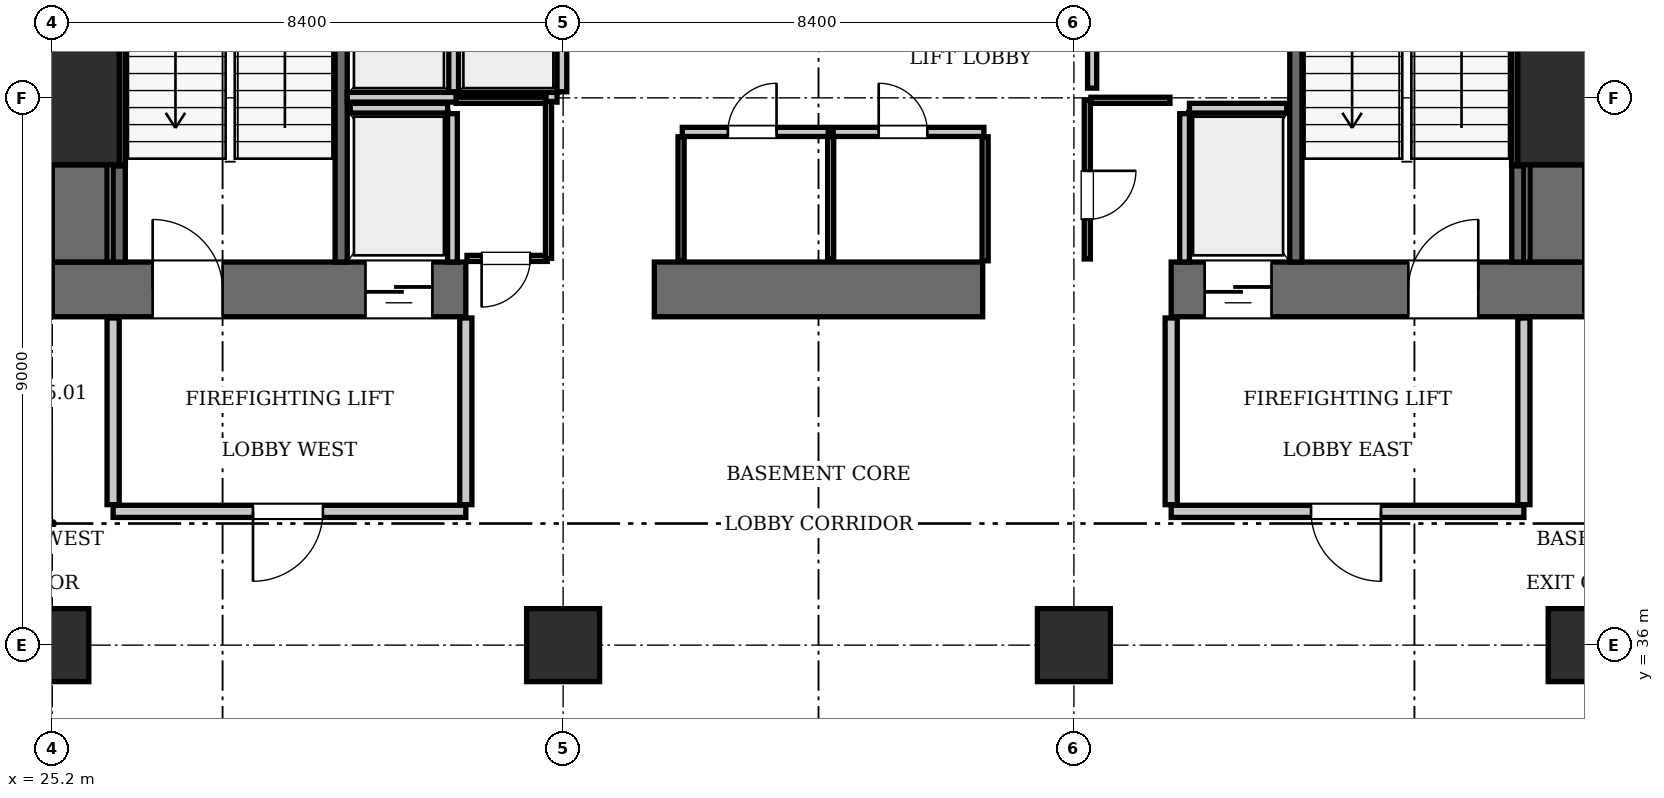
"""IFC4 building model, lengths in metres.
Left out: names, types, materials, properties, quantities, classifications, styles, units other than length and angle.
Written with IfcOpenShell. Run it as: python <this file> out.ifc"""

import sys

from ifc_helpers import new_model, si_unit, direction, frame, frame_2d, origin, origin_2d, place, context, subcontext, project, spatial, rectangle, extrude, element, fill, save


model = new_model("IFC4")
c1 = context("Model", 3, precision=1e-05, world=origin(), true_north=direction((0.0, 1.0)))
c2 = subcontext(c1, "Body", "Model", "MODEL_VIEW")
j1 = project(units=[si_unit("LENGTHUNIT", "METRE"), si_unit("PLANEANGLEUNIT", "RADIAN")], contexts=[c1])
p1 = place(None, origin())
s1 = spatial("IfcSite", under=j1, at=p1, CompositionType="ELEMENT")
p2 = place(p1, origin())
s2 = spatial("IfcBuilding", under=s1, at=p2, CompositionType="ELEMENT")
p3 = place(p2, frame((0.0, 0.0, -9.8)))
s3 = spatial("IfcBuildingStorey", under=s2, at=p3, CompositionType="ELEMENT", Elevation=-9.8)
for number, where, z_axis, x_axis in (
    (1, (25.2, 45.0, -0.4), (0.0, 0.0, 1.0), (1.0, 0.0, 0.0)),
    (2, (50.4, 45.0, -0.4), (0.0, 0.0, 1.0), (1.0, 0.0, 0.0)),
):
    element("IfcColumn", number, at=place(p3, frame(where, z_axis=z_axis, x_axis=x_axis)), inside=s3, PredefinedType="COLUMN", context=c2, shape_type="SweptSolid", body=[
        extrude(rectangle(XDim=2.2, YDim=2.2, at=origin_2d()), origin(), (0.0, 0.0, 1.0), 4.95),
    ])
p4 = place(p3, frame((25.2, 41.85, 0.0), z_axis=(0.0, 0.0, 1.0), x_axis=(1.0, 0.0, 0.0)))
e3 = element("IfcWall", 3, at=p4, inside=s3, PredefinedType="SHEAR", context=c2, shape_type="SweptSolid", body=[
    extrude(rectangle(XDim=6.8, YDim=0.9, at=frame_2d((3.4, 0.0))), origin(), (0.0, 0.0, 1.0), 4.55),
])
p5 = place(p4, frame((1.65, 0.0, 0.0)))
e4 = element("IfcOpeningElement", 4, at=p5, cuts=e3, PredefinedType="OPENING", context=c2, shape_type="SweptSolid", body=[
    extrude(rectangle(XDim=1.15, YDim=2.15, at=frame_2d((0.575, 1.075))), frame((0.0, 0.46, 0.0), z_axis=(0.0, -1.0, 0.0), x_axis=(1.0, 0.0, 0.0)), (0.0, 0.0, 1.0), 0.92),
])
p6 = place(p4, frame((5.15, 0.0, 0.0)))
e5 = element("IfcOpeningElement", 5, at=p6, cuts=e3, PredefinedType="OPENING", context=c2, shape_type="SweptSolid", body=[
    extrude(rectangle(XDim=1.1, YDim=2.2, at=frame_2d((0.55, 1.1))), frame((0.0, 0.46, 0.0), z_axis=(0.0, -1.0, 0.0), x_axis=(1.0, 0.0, 0.0)), (0.0, 0.0, 1.0), 0.92),
])
p7 = place(p3, frame((35.1, 41.85, 0.0), z_axis=(0.0, 0.0, 1.0), x_axis=(1.0, 0.0, 0.0)))
e6 = element("IfcWall", 6, at=p7, inside=s3, PredefinedType="SHEAR", context=c2, shape_type="SweptSolid", body=[
    extrude(rectangle(XDim=5.4, YDim=0.9, at=frame_2d((2.7, 0.0))), origin(), (0.0, 0.0, 1.0), 4.55),
])
p8 = place(p3, frame((43.6, 41.85, 0.0), z_axis=(0.0, 0.0, 1.0), x_axis=(1.0, 0.0, 0.0)))
e7 = element("IfcWall", 7, at=p8, inside=s3, PredefinedType="SHEAR", context=c2, shape_type="SweptSolid", body=[
    extrude(rectangle(XDim=6.8, YDim=0.9, at=frame_2d((3.4, 0.0))), origin(), (0.0, 0.0, 1.0), 4.55),
])
p9 = place(p8, frame((3.9, 0.0, 0.0)))
e8 = element("IfcOpeningElement", 8, at=p9, cuts=e7, PredefinedType="OPENING", context=c2, shape_type="SweptSolid", body=[
    extrude(rectangle(XDim=1.15, YDim=2.15, at=frame_2d((0.575, 1.075))), frame((0.0, 0.46, 0.0), z_axis=(0.0, -1.0, 0.0), x_axis=(1.0, 0.0, 0.0)), (0.0, 0.0, 1.0), 0.92),
])
p10 = place(p8, frame((0.55, 0.0, 0.0)))
e9 = element("IfcOpeningElement", 9, at=p10, cuts=e7, PredefinedType="OPENING", context=c2, shape_type="SweptSolid", body=[
    extrude(rectangle(XDim=1.1, YDim=2.2, at=frame_2d((0.55, 1.1))), frame((0.0, 0.46, 0.0), z_axis=(0.0, -1.0, 0.0), x_axis=(1.0, 0.0, 0.0)), (0.0, 0.0, 1.0), 0.92),
])
for number, where, z_axis, x_axis in (
    (10, (25.65, 42.3, 0.0), (0.0, 0.0, 1.0), (0.0, 1.0, 0.0)),
    (11, (49.95, 42.3, 0.0), (0.0, 0.0, 1.0), (0.0, 1.0, 0.0)),
):
    element("IfcWall", number, at=place(p3, frame(where, z_axis=z_axis, x_axis=x_axis)), inside=s3, PredefinedType="SHEAR", context=c2, shape_type="SweptSolid", body=[
        extrude(rectangle(XDim=1.6, YDim=0.9, at=frame_2d((0.8, 0.0))), origin(), (0.0, 0.0, 1.0), 4.55),
    ])
for number, where, z_axis, x_axis in (
    (12, (25.2, 36.0, -0.4), (0.0, 0.0, 1.0), (1.0, 0.0, 0.0)),
    (13, (33.6, 36.0, -0.4), (0.0, 0.0, 1.0), (1.0, 0.0, 0.0)),
    (14, (42.0, 36.0, -0.4), (0.0, 0.0, 1.0), (1.0, 0.0, 0.0)),
    (15, (50.4, 36.0, -0.4), (0.0, 0.0, 1.0), (1.0, 0.0, 0.0)),
):
    element("IfcColumn", number, at=place(p3, frame(where, z_axis=z_axis, x_axis=x_axis)), inside=s3, PredefinedType="COLUMN", context=c2, shape_type="SweptSolid", body=[
        extrude(rectangle(XDim=1.2, YDim=1.2, at=origin_2d()), origin(), (0.0, 0.0, 1.0), 4.95),
    ])
p11 = place(p3, frame((29.95, 42.3, 0.0), z_axis=(0.0, 0.0, 1.0), x_axis=(0.0, 1.0, 0.0)))
e16 = element("IfcWall", 16, at=p11, inside=s3, PredefinedType="SOLIDWALL", context=c2, shape_type="SweptSolid", body=[
    extrude(rectangle(XDim=8.85, YDim=0.2, at=frame_2d((4.425, 0.0))), origin(), (0.0, 0.0, 1.0), 4.2),
])
p12 = place(p3, frame((26.3, 42.3, 0.0), z_axis=(0.0, 0.0, 1.0), x_axis=(0.0, 1.0, 0.0)))
e17 = element("IfcWall", 17, at=p12, inside=s3, PredefinedType="SOLIDWALL", context=c2, shape_type="SweptSolid", body=[
    extrude(rectangle(XDim=1.58, YDim=0.2, at=frame_2d((0.79, 0.0))), origin(), (0.0, 0.0, 1.0), 4.2),
])
p13 = place(p3, frame((26.352, 43.9, 0.0), z_axis=(0.0, 0.0, 1.0), x_axis=(0.0, 1.0, 0.0)))
e18 = element("IfcWall", 18, at=p13, inside=s3, PredefinedType="SOLIDWALL", context=c2, shape_type="SweptSolid", body=[
    extrude(rectangle(XDim=2.2, YDim=0.1, at=frame_2d((1.1, 0.0))), origin(), (0.0, 0.0, 1.0), 4.2),
])
p14 = place(p3, frame((45.65, 42.3, 0.0), z_axis=(0.0, 0.0, 1.0), x_axis=(0.0, 1.0, 0.0)))
e19 = element("IfcWall", 19, at=p14, inside=s3, PredefinedType="SOLIDWALL", context=c2, shape_type="SweptSolid", body=[
    extrude(rectangle(XDim=8.85, YDim=0.2, at=frame_2d((4.425, 0.0))), origin(), (0.0, 0.0, 1.0), 4.2),
])
p15 = place(p3, frame((49.3, 42.3, 0.0), z_axis=(0.0, 0.0, 1.0), x_axis=(0.0, 1.0, 0.0)))
e20 = element("IfcWall", 20, at=p15, inside=s3, PredefinedType="SOLIDWALL", context=c2, shape_type="SweptSolid", body=[
    extrude(rectangle(XDim=1.58, YDim=0.2, at=frame_2d((0.79, 0.0))), origin(), (0.0, 0.0, 1.0), 4.2),
])
p16 = place(p3, frame((49.248, 43.9, 0.0), z_axis=(0.0, 0.0, 1.0), x_axis=(0.0, 1.0, 0.0)))
e21 = element("IfcWall", 21, at=p16, inside=s3, PredefinedType="SOLIDWALL", context=c2, shape_type="SweptSolid", body=[
    extrude(rectangle(XDim=2.2, YDim=0.1, at=frame_2d((1.1, 0.0))), origin(), (0.0, 0.0, 1.0), 4.2),
])
p17 = place(p3, frame((30.1, 44.83, 0.0), z_axis=(0.0, 0.0, 1.0), x_axis=(1.0, 0.0, 0.0)))
e22 = element("IfcWall", 22, at=p17, inside=s3, PredefinedType="SOLIDWALL", context=c2, shape_type="SweptSolid", body=[
    extrude(rectangle(XDim=1.6, YDim=0.16, at=frame_2d((0.8, 0.0))), origin(), (0.0, 0.0, 1.0), 4.2),
])
p18 = place(p3, frame((31.78, 42.3, 0.0), z_axis=(0.0, 0.0, 1.0), x_axis=(0.0, 1.0, 0.0)))
e23 = element("IfcWall", 23, at=p18, inside=s3, PredefinedType="SOLIDWALL", context=c2, shape_type="SweptSolid", body=[
    extrude(rectangle(XDim=2.44, YDim=0.16, at=frame_2d((1.22, 0.0))), origin(), (0.0, 0.0, 1.0), 4.2),
])
p19 = place(p3, frame((43.9, 44.83, 0.0), z_axis=(0.0, 0.0, 1.0), x_axis=(1.0, 0.0, 0.0)))
e24 = element("IfcWall", 24, at=p19, inside=s3, PredefinedType="SOLIDWALL", context=c2, shape_type="SweptSolid", body=[
    extrude(rectangle(XDim=1.6, YDim=0.16, at=frame_2d((0.8, 0.0))), origin(), (0.0, 0.0, 1.0), 4.2),
])
p20 = place(p3, frame((43.82, 42.3, 0.0), z_axis=(0.0, 0.0, 1.0), x_axis=(0.0, 1.0, 0.0)))
e25 = element("IfcWall", 25, at=p20, inside=s3, PredefinedType="SOLIDWALL", context=c2, shape_type="SweptSolid", body=[
    extrude(rectangle(XDim=2.44, YDim=0.16, at=frame_2d((1.22, 0.0))), origin(), (0.0, 0.0, 1.0), 4.2),
])
for number, where, z_axis, x_axis in (
    (26, (31.8, 45.1, 0.0), (0.0, 0.0, 1.0), (0.0, 1.0, 0.0)),
    (27, (33.58, 45.1, 0.0), (0.0, 0.0, 1.0), (0.0, 1.0, 0.0)),
):
    element("IfcWall", number, at=place(p3, frame(where, z_axis=z_axis, x_axis=x_axis)), inside=s3, PredefinedType="SOLIDWALL", context=c2, shape_type="SweptSolid", body=[
        extrude(rectangle(XDim=1.95, YDim=0.16, at=frame_2d((0.975, 0.0))), origin(), (0.0, 0.0, 1.0), 4.2),
    ])
p21 = place(p3, frame((30.05, 45.01, 0.0), z_axis=(0.0, 0.0, 1.0), x_axis=(1.0, 0.0, 0.0)))
e28 = element("IfcWall", 28, at=p21, inside=s3, PredefinedType="SOLIDWALL", context=c2, shape_type="SweptSolid", body=[
    extrude(rectangle(XDim=3.45, YDim=0.16, at=frame_2d((1.725, 0.0))), origin(), (0.0, 0.0, 1.0), 4.2),
])
p22 = place(p3, frame((26.2, 38.2, 0.0), z_axis=(0.0, 0.0, 1.0), x_axis=(1.0, 0.0, 0.0)))
e29 = element("IfcWall", 29, at=p22, inside=s3, PredefinedType="PARTITIONING", context=c2, shape_type="SweptSolid", body=[
    extrude(rectangle(XDim=5.8, YDim=0.2, at=frame_2d((2.9, 0.0))), origin(), (0.0, 0.0, 1.0), 4.2),
])
p23 = place(p22, frame((2.3, 0.0, 0.0)))
e30 = element("IfcOpeningElement", 30, at=p23, cuts=e29, PredefinedType="OPENING", context=c2, shape_type="SweptSolid", body=[
    extrude(rectangle(XDim=1.15, YDim=2.15, at=frame_2d((0.575, 1.075))), frame((0.0, 0.11, 0.0), z_axis=(0.0, -1.0, 0.0), x_axis=(1.0, 0.0, 0.0)), (0.0, 0.0, 1.0), 0.22),
])
for number, where, z_axis, x_axis in (
    (31, (26.2, 38.31, 0.0), (0.0, 0.0, 1.0), (0.0, 1.0, 0.0)),
    (32, (32.0, 38.31, 0.0), (0.0, 0.0, 1.0), (0.0, 1.0, 0.0)),
):
    element("IfcWall", number, at=place(p3, frame(where, z_axis=z_axis, x_axis=x_axis)), inside=s3, PredefinedType="PARTITIONING", context=c2, shape_type="SweptSolid", body=[
        extrude(rectangle(XDim=3.07, YDim=0.2, at=frame_2d((1.535, 0.0))), origin(), (0.0, 0.0, 1.0), 4.2),
    ])
p24 = place(p3, frame((43.6, 38.2, 0.0), z_axis=(0.0, 0.0, 1.0), x_axis=(1.0, 0.0, 0.0)))
e33 = element("IfcWall", 33, at=p24, inside=s3, PredefinedType="PARTITIONING", context=c2, shape_type="SweptSolid", body=[
    extrude(rectangle(XDim=5.8, YDim=0.2, at=frame_2d((2.9, 0.0))), origin(), (0.0, 0.0, 1.0), 4.2),
])
p25 = place(p24, frame((2.3, 0.0, 0.0)))
e34 = element("IfcOpeningElement", 34, at=p25, cuts=e33, PredefinedType="OPENING", context=c2, shape_type="SweptSolid", body=[
    extrude(rectangle(XDim=1.15, YDim=2.15, at=frame_2d((0.575, 1.075))), frame((0.0, 0.11, 0.0), z_axis=(0.0, -1.0, 0.0), x_axis=(1.0, 0.0, 0.0)), (0.0, 0.0, 1.0), 0.22),
])
for number, where, z_axis, x_axis in (
    (35, (43.6, 38.31, 0.0), (0.0, 0.0, 1.0), (0.0, 1.0, 0.0)),
    (36, (49.4, 38.31, 0.0), (0.0, 0.0, 1.0), (0.0, 1.0, 0.0)),
):
    element("IfcWall", number, at=place(p3, frame(where, z_axis=z_axis, x_axis=x_axis)), inside=s3, PredefinedType="PARTITIONING", context=c2, shape_type="SweptSolid", body=[
        extrude(rectangle(XDim=3.07, YDim=0.2, at=frame_2d((1.535, 0.0))), origin(), (0.0, 0.0, 1.0), 4.2),
    ])
p26 = place(p3, frame((32.02, 42.36, 0.0), z_axis=(0.0, 0.0, 1.0), x_axis=(1.0, 0.0, 0.0)))
e37 = element("IfcWall", 37, at=p26, inside=s3, PredefinedType="PARTITIONING", context=c2, shape_type="SweptSolid", body=[
    extrude(rectangle(XDim=1.32, YDim=0.1, at=frame_2d((0.66, 0.0))), origin(), (0.0, 0.0, 1.0), 4.2),
])
p27 = place(p26, frame((0.24, 0.0, 0.0)))
e38 = element("IfcOpeningElement", 38, at=p27, cuts=e37, PredefinedType="OPENING", context=c2, shape_type="SweptSolid", body=[
    extrude(rectangle(XDim=0.8, YDim=2.05, at=frame_2d((0.4, 1.025))), frame((0.0, 0.06, 0.0), z_axis=(0.0, -1.0, 0.0), x_axis=(1.0, 0.0, 0.0)), (0.0, 0.0, 1.0), 0.12),
])
p28 = place(p3, frame((31.84, 44.96, 0.0), z_axis=(0.0, 0.0, 1.0), x_axis=(1.0, 0.0, 0.0)))
e39 = element("IfcWall", 39, at=p28, inside=s3, PredefinedType="PARTITIONING", context=c2, shape_type="SweptSolid", body=[
    extrude(rectangle(XDim=1.48, YDim=0.1, at=frame_2d((0.74, 0.0))), origin(), (0.0, 0.0, 1.0), 4.2),
])
p29 = place(p3, frame((33.36, 42.36, 0.0), z_axis=(0.0, 0.0, 1.0), x_axis=(0.0, 1.0, 0.0)))
e40 = element("IfcWall", 40, at=p29, inside=s3, PredefinedType="PARTITIONING", context=c2, shape_type="SweptSolid", body=[
    extrude(rectangle(XDim=2.58, YDim=0.1, at=frame_2d((1.29, 0.0))), origin(), (0.0, 0.0, 1.0), 4.2),
])
p30 = place(p3, frame((42.22, 42.35, 0.0), z_axis=(0.0, 0.0, 1.0), x_axis=(0.0, 1.0, 0.0)))
e41 = element("IfcWall", 41, at=p30, inside=s3, PredefinedType="PARTITIONING", context=c2, shape_type="SweptSolid", body=[
    extrude(rectangle(XDim=2.61, YDim=0.1, at=frame_2d((1.305, 0.0))), origin(), (0.0, 0.0, 1.0), 4.2),
])
p31 = place(p30, frame((0.65, 0.0, 0.0)))
e42 = element("IfcOpeningElement", 42, at=p31, cuts=e41, PredefinedType="OPENING", context=c2, shape_type="SweptSolid", body=[
    extrude(rectangle(XDim=0.8, YDim=2.05, at=frame_2d((0.4, 1.025))), frame((0.0, 0.06, 0.0), z_axis=(0.0, -1.0, 0.0), x_axis=(1.0, 0.0, 0.0)), (0.0, 0.0, 1.0), 0.12),
])
p32 = place(p3, frame((42.28, 44.96, 0.0), z_axis=(0.0, 0.0, 1.0), x_axis=(1.0, 0.0, 0.0)))
e43 = element("IfcWall", 43, at=p32, inside=s3, PredefinedType="PARTITIONING", context=c2, shape_type="SweptSolid", body=[
    extrude(rectangle(XDim=1.3, YDim=0.1, at=frame_2d((0.65, 0.0))), origin(), (0.0, 0.0, 1.0), 4.2),
])
p33 = place(p3, frame((35.56, 44.44, 0.0), z_axis=(0.0, 0.0, 1.0), x_axis=(1.0, 0.0, 0.0)))
e44 = element("IfcWall", 44, at=p33, inside=s3, PredefinedType="PARTITIONING", context=c2, shape_type="SweptSolid", body=[
    extrude(rectangle(XDim=2.4, YDim=0.15, at=frame_2d((1.2, 0.0))), origin(), (0.0, 0.0, 1.0), 4.2),
])
p34 = place(p33, frame((0.75, 0.0, 0.0)))
e45 = element("IfcOpeningElement", 45, at=p34, cuts=e44, PredefinedType="OPENING", context=c2, shape_type="SweptSolid", body=[
    extrude(rectangle(XDim=0.8, YDim=2.05, at=frame_2d((0.4, 1.025))), frame((0.0, 0.085, 0.0), z_axis=(0.0, -1.0, 0.0), x_axis=(1.0, 0.0, 0.0)), (0.0, 0.0, 1.0), 0.17),
])
p35 = place(p3, frame((38.04, 44.44, 0.0), z_axis=(0.0, 0.0, 1.0), x_axis=(1.0, 0.0, 0.0)))
e46 = element("IfcWall", 46, at=p35, inside=s3, PredefinedType="PARTITIONING", context=c2, shape_type="SweptSolid", body=[
    extrude(rectangle(XDim=2.48, YDim=0.15, at=frame_2d((1.24, 0.0))), origin(), (0.0, 0.0, 1.0), 4.2),
])
p36 = place(p35, frame((0.75, 0.0, 0.0)))
e47 = element("IfcOpeningElement", 47, at=p36, cuts=e46, PredefinedType="OPENING", context=c2, shape_type="SweptSolid", body=[
    extrude(rectangle(XDim=0.8, YDim=2.05, at=frame_2d((0.4, 1.025))), frame((0.0, 0.085, 0.0), z_axis=(0.0, -1.0, 0.0), x_axis=(1.0, 0.0, 0.0)), (0.0, 0.0, 1.0), 0.17),
])
for number, where, z_axis, x_axis in (
    (48, (35.54, 42.32, 0.0), (0.0, 0.0, 1.0), (0.0, 1.0, 0.0)),
    (49, (40.54, 42.32, 0.0), (0.0, 0.0, 1.0), (0.0, 1.0, 0.0)),
):
    element("IfcWall", number, at=place(p3, frame(where, z_axis=z_axis, x_axis=x_axis)), inside=s3, PredefinedType="PARTITIONING", context=c2, shape_type="SweptSolid", body=[
        extrude(rectangle(XDim=2.04, YDim=0.1, at=frame_2d((1.02, 0.0))), origin(), (0.0, 0.0, 1.0), 4.2),
    ])
p37 = place(p3, frame((38.0, 42.35, 0.0), z_axis=(0.0, 0.0, 1.0), x_axis=(0.0, 1.0, 0.0)))
e50 = element("IfcWall", 50, at=p37, inside=s3, PredefinedType="PARTITIONING", context=c2, shape_type="SweptSolid", body=[
    extrude(rectangle(XDim=2.01, YDim=0.1, at=frame_2d((1.005, 0.0))), origin(), (0.0, 0.0, 1.0), 4.2),
])
p38 = place(p3, frame((42.3, 45.16, 0.0), z_axis=(0.0, 0.0, 1.0), x_axis=(0.0, 1.0, 0.0)))
e51 = element("IfcWall", 51, at=p38, inside=s3, PredefinedType="PARTITIONING", context=c2, shape_type="SweptSolid", body=[
    extrude(rectangle(XDim=4.24, YDim=0.15, at=frame_2d((2.12, 0.0))), origin(), (0.0, 0.0, 1.0), 4.2),
])
p39 = place(p38, frame((1.8, 0.0, 0.0)))
e52 = element("IfcOpeningElement", 52, at=p39, cuts=e51, PredefinedType="OPENING", context=c2, shape_type="SweptSolid", body=[
    extrude(rectangle(XDim=0.9, YDim=2.1, at=frame_2d((0.45, 1.05))), frame((0.0, 0.085, 0.0), z_axis=(0.0, -1.0, 0.0), x_axis=(1.0, 0.0, 0.0)), (0.0, 0.0, 1.0), 0.17),
])
p40 = place(p5, origin())
e53 = element("IfcDoor", 53, at=p40, inside=s3, OperationType="SINGLE_SWING_LEFT", PredefinedType="DOOR", context=c2, shape_type="SweptSolid", body=[
    extrude(rectangle(XDim=1.15, YDim=2.15, at=frame_2d((0.575, 1.075))), frame((0.0, 0.025, 0.0), z_axis=(0.0, -1.0, 0.0), x_axis=(1.0, 0.0, 0.0)), (0.0, 0.0, 1.0), 0.05),
])
fill(e4, e53)
p41 = place(p9, origin())
e54 = element("IfcDoor", 54, at=p41, inside=s3, OperationType="SINGLE_SWING_RIGHT", PredefinedType="DOOR", context=c2, shape_type="SweptSolid", body=[
    extrude(rectangle(XDim=1.15, YDim=2.15, at=frame_2d((0.575, 1.075))), frame((0.0, 0.025, 0.0), z_axis=(0.0, -1.0, 0.0), x_axis=(1.0, 0.0, 0.0)), (0.0, 0.0, 1.0), 0.05),
])
fill(e8, e54)
p42 = place(p6, frame((1.1, 0.0, 0.0), z_axis=(0.0, 0.0, 1.0), x_axis=(-1.0, 0.0, 0.0)))
e55 = element("IfcDoor", 55, at=p42, inside=s3, OperationType="SLIDING_TO_LEFT", PredefinedType="DOOR", context=c2, shape_type="SweptSolid", body=[
    extrude(rectangle(XDim=1.1, YDim=2.2, at=frame_2d((0.55, 1.1))), frame((0.0, 0.025, 0.0), z_axis=(0.0, -1.0, 0.0), x_axis=(1.0, 0.0, 0.0)), (0.0, 0.0, 1.0), 0.05),
])
fill(e5, e55)
p43 = place(p10, frame((1.1, 0.0, 0.0), z_axis=(0.0, 0.0, 1.0), x_axis=(-1.0, 0.0, 0.0)))
e56 = element("IfcDoor", 56, at=p43, inside=s3, OperationType="SLIDING_TO_LEFT", PredefinedType="DOOR", context=c2, shape_type="SweptSolid", body=[
    extrude(rectangle(XDim=1.1, YDim=2.2, at=frame_2d((0.55, 1.1))), frame((0.0, 0.025, 0.0), z_axis=(0.0, -1.0, 0.0), x_axis=(1.0, 0.0, 0.0)), (0.0, 0.0, 1.0), 0.05),
])
fill(e9, e56)
p44 = place(p23, frame((1.15, 0.0, 0.0), z_axis=(0.0, 0.0, 1.0), x_axis=(-1.0, 0.0, 0.0)))
e57 = element("IfcDoor", 57, at=p44, inside=s3, OperationType="SINGLE_SWING_RIGHT", PredefinedType="DOOR", context=c2, shape_type="SweptSolid", body=[
    extrude(rectangle(XDim=1.15, YDim=2.15, at=frame_2d((0.575, 1.075))), frame((0.0, 0.025, 0.0), z_axis=(0.0, -1.0, 0.0), x_axis=(1.0, 0.0, 0.0)), (0.0, 0.0, 1.0), 0.05),
])
fill(e30, e57)
p45 = place(p25, frame((1.15, 0.0, 0.0), z_axis=(0.0, 0.0, 1.0), x_axis=(-1.0, 0.0, 0.0)))
e58 = element("IfcDoor", 58, at=p45, inside=s3, OperationType="SINGLE_SWING_LEFT", PredefinedType="DOOR", context=c2, shape_type="SweptSolid", body=[
    extrude(rectangle(XDim=1.15, YDim=2.15, at=frame_2d((0.575, 1.075))), frame((0.0, 0.025, 0.0), z_axis=(0.0, -1.0, 0.0), x_axis=(1.0, 0.0, 0.0)), (0.0, 0.0, 1.0), 0.05),
])
fill(e34, e58)
p46 = place(p27, frame((0.8, 0.0, 0.0), z_axis=(0.0, 0.0, 1.0), x_axis=(-1.0, 0.0, 0.0)))
e59 = element("IfcDoor", 59, at=p46, inside=s3, OperationType="SINGLE_SWING_RIGHT", PredefinedType="DOOR", context=c2, shape_type="SweptSolid", body=[
    extrude(rectangle(XDim=0.8, YDim=2.05, at=frame_2d((0.4, 1.025))), frame((0.0, 0.025, 0.0), z_axis=(0.0, -1.0, 0.0), x_axis=(1.0, 0.0, 0.0)), (0.0, 0.0, 1.0), 0.05),
])
fill(e38, e59)
p47 = place(p31, frame((0.8, 0.0, 0.0), z_axis=(0.0, 0.0, 1.0), x_axis=(-1.0, 0.0, 0.0)))
e60 = element("IfcDoor", 60, at=p47, inside=s3, OperationType="SINGLE_SWING_LEFT", PredefinedType="DOOR", context=c2, shape_type="SweptSolid", body=[
    extrude(rectangle(XDim=0.8, YDim=2.05, at=frame_2d((0.4, 1.025))), frame((0.0, 0.025, 0.0), z_axis=(0.0, -1.0, 0.0), x_axis=(1.0, 0.0, 0.0)), (0.0, 0.0, 1.0), 0.05),
])
fill(e42, e60)
p48 = place(p34, origin())
e61 = element("IfcDoor", 61, at=p48, inside=s3, OperationType="SINGLE_SWING_RIGHT", PredefinedType="DOOR", context=c2, shape_type="SweptSolid", body=[
    extrude(rectangle(XDim=0.8, YDim=2.05, at=frame_2d((0.4, 1.025))), frame((0.0, 0.025, 0.0), z_axis=(0.0, -1.0, 0.0), x_axis=(1.0, 0.0, 0.0)), (0.0, 0.0, 1.0), 0.05),
])
fill(e45, e61)
p49 = place(p36, origin())
e62 = element("IfcDoor", 62, at=p49, inside=s3, OperationType="SINGLE_SWING_LEFT", PredefinedType="DOOR", context=c2, shape_type="SweptSolid", body=[
    extrude(rectangle(XDim=0.8, YDim=2.05, at=frame_2d((0.4, 1.025))), frame((0.0, 0.025, 0.0), z_axis=(0.0, -1.0, 0.0), x_axis=(1.0, 0.0, 0.0)), (0.0, 0.0, 1.0), 0.05),
])
fill(e47, e62)
save(model, sys.argv[1])
